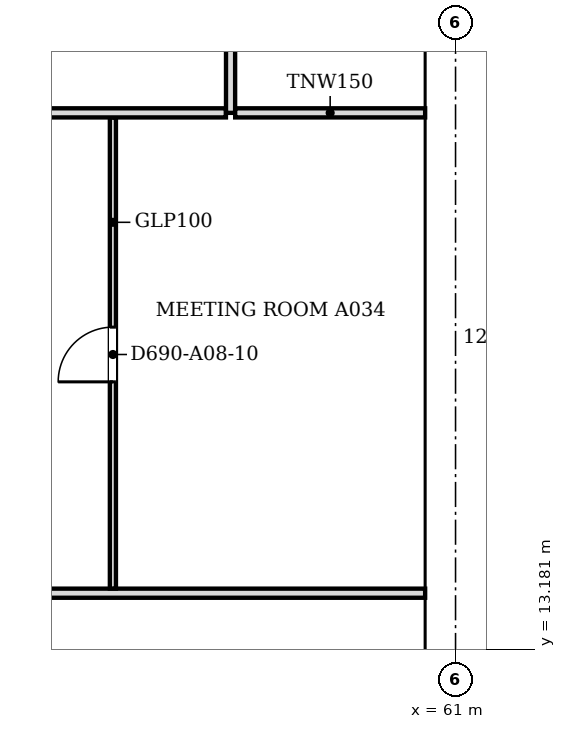
"""IFC4 building model, lengths in metres.
Left out: names, types, materials, properties, quantities, classifications, styles, units other than length and angle.
Written with IfcOpenShell. Run it as: python <this file> out.ifc"""

import sys

from ifc_helpers import new_model, si_unit, direction, frame, frame_2d, origin, place, context, subcontext, project, spatial, polyline, rectangle, outline, extrude, faceted_brep, source, transform, mapped, element, fill, save


model = new_model("IFC4")
c1 = context("Model", 3, precision=1e-05, world=origin(), true_north=direction((0.0, 1.0)))
c2 = subcontext(c1, "Body", "Model", "MODEL_VIEW")
j1 = project(units=[si_unit("LENGTHUNIT", "METRE"), si_unit("PLANEANGLEUNIT", "RADIAN")], contexts=[c1])
p1 = place(None, origin())
s1 = spatial("IfcSite", under=j1, at=p1, CompositionType="ELEMENT")
p2 = place(p1, origin())
s2 = spatial("IfcBuilding", under=s1, at=p2, CompositionType="ELEMENT")
p3 = place(p2, frame((0.0, 0.0, 91.4)))
s3 = spatial("IfcBuildingStorey", under=s2, at=p3, CompositionType="ELEMENT", Elevation=91.4)
m1 = source(origin(), c2, "Body", "SweptSolid", [
    extrude(outline(polyline([(3.05, 0.0), (6.1, 3.8), (3.05, 7.6), (0.0, 3.8), (3.05, 0.0)])), frame((0.0, 0.25, 0.0), z_axis=(0.0, -1.0, 0.0), x_axis=(1.0, 0.0, 0.0)), (0.0, 0.0, 1.0), 0.5),
])
p4 = place(p3, frame((60.75, 12.2, -3.8), z_axis=(0.0, 0.0, 1.0), x_axis=(0.0, 1.0, 0.0)))
e1 = element("IfcWall", 1, at=p4, inside=s3, PredefinedType="SOLIDWALL", context=c2, shape_type="MappedRepresentation", body=[
    mapped(m1, transform((0.0, 0.0, 0.0), scale=1.0)),
])
m2 = source(origin(), c2, "Body", "SweptSolid", [
    extrude(outline(polyline([(3.05, 0.399), (5.78, 3.8), (3.05, 7.2), (0.321, 3.8), (3.05, 0.399)])), frame((0.0, 0.26, 0.0), z_axis=(0.0, -1.0, 0.0), x_axis=(1.0, 0.0, 0.0)), (0.0, 0.0, 1.0), 0.52),
])
p5 = place(p4, origin())
e2 = element("IfcOpeningElement", 2, at=p5, cuts=e1, PredefinedType="OPENING", context=c2, shape_type="MappedRepresentation", body=[
    mapped(m2, transform((0.0, 0.0, 0.0), scale=1.0)),
])
m3 = source(origin(), c2, "Body", "Brep", [
    faceted_brep([(3.05, -0.25, 0.0), (6.1, -0.25, 3.8), (6.1, -0.25, 3.8), (3.05, -0.25, 7.6), (0.0, -0.25, 3.8), (0.0, 0.25, 3.8), (3.05, 0.25, 7.6), (6.1, 0.25, 3.8), (6.1, 0.25, 3.8), (3.05, 0.25, 0.0)], [[[0, 1, 2, 3, 4]], [[5, 6, 7, 8, 9]], [[9, 8, 1, 0]], [[7, 6, 3, 2]], [[6, 5, 4, 3]], [[5, 9, 0, 4]], [[1, 8, 7, 2]]]),
])
p6 = place(p3, frame((60.75, 18.3, -3.8), z_axis=(0.0, 0.0, 1.0), x_axis=(0.0, 1.0, 0.0)))
e3 = element("IfcWall", 3, at=p6, inside=s3, PredefinedType="SOLIDWALL", context=c2, shape_type="MappedRepresentation", body=[
    mapped(m3, transform((0.0, 0.0, 0.0), scale=1.0)),
])
p7 = place(p6, origin())
e4 = element("IfcOpeningElement", 4, at=p7, cuts=e3, PredefinedType="OPENING", context=c2, shape_type="MappedRepresentation", body=[
    mapped(m2, transform((0.0, 0.0, 0.0), scale=1.0)),
])
p8 = place(p2, frame((0.0, 0.0, 95.2)))
s4 = spatial("IfcBuildingStorey", under=s2, at=p8, CompositionType="ELEMENT", Elevation=95.2)
m4 = source(origin(), c2, "Body", "SweptSolid", [
    extrude(outline(polyline([(3.05, 0.0), (6.1, 3.8), (3.05, 7.6), (0.0, 3.8), (3.05, 0.0)])), frame((0.0, 0.25, 0.0), z_axis=(0.0, -1.0, 0.0), x_axis=(1.0, 0.0, 0.0)), (0.0, 0.0, 1.0), 0.5),
])
p9 = place(p8, frame((60.75, 9.15, -3.8), z_axis=(0.0, 0.0, 1.0), x_axis=(0.0, 1.0, 0.0)))
e5 = element("IfcWall", 5, at=p9, inside=s4, PredefinedType="SOLIDWALL", context=c2, shape_type="MappedRepresentation", body=[
    mapped(m4, transform((0.0, 0.0, 0.0), scale=1.0)),
])
m5 = source(origin(), c2, "Body", "SweptSolid", [
    extrude(outline(polyline([(3.05, 0.399), (5.78, 3.8), (3.05, 7.201), (0.321, 3.8), (3.05, 0.399)])), frame((0.0, 0.26, 0.0), z_axis=(0.0, -1.0, 0.0), x_axis=(1.0, 0.0, 0.0)), (0.0, 0.0, 1.0), 0.52),
])
p10 = place(p9, origin())
e6 = element("IfcOpeningElement", 6, at=p10, cuts=e5, PredefinedType="OPENING", context=c2, shape_type="MappedRepresentation", body=[
    mapped(m5, transform((0.0, 0.0, 0.0), scale=1.0)),
])
p11 = place(p8, frame((60.75, 15.25, -3.8), z_axis=(0.0, 0.0, 1.0), x_axis=(0.0, 1.0, 0.0)))
e7 = element("IfcWall", 7, at=p11, inside=s4, PredefinedType="SOLIDWALL", context=c2, shape_type="MappedRepresentation", body=[
    mapped(m4, transform((0.0, 0.0, 0.0), scale=1.0)),
])
p12 = place(p11, origin())
e8 = element("IfcOpeningElement", 8, at=p12, cuts=e7, PredefinedType="OPENING", context=c2, shape_type="MappedRepresentation", body=[
    mapped(m5, transform((0.0, 0.0, 0.0), scale=1.0)),
])
m6 = source(origin(), c2, "Body", "Brep", [
    faceted_brep([(3.05, -0.25, 0.0), (6.1, -0.25, 3.8), (6.1, -0.25, 3.8), (3.05, -0.25, 7.6), (0.0, -0.25, 3.8), (0.0, 0.25, 3.8), (3.05, 0.25, 7.6), (6.1, 0.25, 3.8), (6.1, 0.25, 3.8), (3.05, 0.25, 0.0)], [[[0, 1, 2, 3, 4]], [[5, 6, 7, 8, 9]], [[9, 8, 1, 0]], [[7, 6, 3, 2]], [[6, 5, 4, 3]], [[5, 9, 0, 4]], [[1, 8, 7, 2]]]),
])
p13 = place(p8, frame((60.75, 21.35, -3.8), z_axis=(0.0, 0.0, 1.0), x_axis=(0.0, 1.0, 0.0)))
e9 = element("IfcWall", 9, at=p13, inside=s4, PredefinedType="SOLIDWALL", context=c2, shape_type="MappedRepresentation", body=[
    mapped(m6, transform((0.0, 0.0, 0.0), scale=1.0)),
])
p14 = place(p13, origin())
e10 = element("IfcOpeningElement", 10, at=p14, cuts=e9, PredefinedType="OPENING", context=c2, shape_type="MappedRepresentation", body=[
    mapped(m5, transform((0.0, 0.0, 0.0), scale=1.0)),
])
p15 = place(p3, frame((45.476, 14.1, 0.0), z_axis=(0.0, 0.0, 1.0), x_axis=(1.0, 0.0, 0.0)))
e11 = element("IfcWall", 11, at=p15, inside=s3, PredefinedType="PARTITIONING", context=c2, shape_type="SweptSolid", body=[
    extrude(rectangle(XDim=15.024, YDim=0.15, at=frame_2d((7.512, 0.0))), origin(), (0.0, 0.0, 1.0), 2.895),
])
p16 = place(p3, frame((55.365, 21.924, 0.0), z_axis=(0.0, 0.0, 1.0), x_axis=(0.0, -1.0, 0.0)))
e12 = element("IfcWall", 12, at=p16, inside=s3, PredefinedType="PARTITIONING", context=c2, shape_type="SweptSolid", body=[
    extrude(rectangle(XDim=7.748, YDim=0.1, at=frame_2d((3.874, 0.0))), origin(), (0.0, 0.0, 1.0), 2.895),
])
m7 = source(origin(), c2, "Body", "SweptSolid", [
    extrude(rectangle(XDim=0.9, YDim=2.1, at=frame_2d((0.45, 1.05))), frame((0.0, 0.06, 0.0), z_axis=(0.0, -1.0, 0.0), x_axis=(1.0, 0.0, 0.0)), (0.0, 0.0, 1.0), 0.12),
])
p17 = place(p16, frame((3.448, 0.0, 0.0)))
e13 = element("IfcOpeningElement", 13, at=p17, cuts=e12, PredefinedType="OPENING", context=c2, shape_type="MappedRepresentation", body=[
    mapped(m7, transform((0.0, 0.0, 0.0), scale=1.0)),
])
p18 = place(p3, frame((45.4, 22.0, 0.0), z_axis=(0.0, 0.0, 1.0), x_axis=(1.0, 0.0, 0.0)))
e14 = element("IfcWall", 14, at=p18, inside=s3, PredefinedType="PARTITIONING", context=c2, shape_type="SweptSolid", body=[
    extrude(rectangle(XDim=11.824, YDim=0.15, at=frame_2d((5.912, 0.0))), origin(), (0.0, 0.0, 1.0), 2.895),
])
p19 = place(p3, frame((57.3, 30.6, 0.0), z_axis=(0.0, 0.0, 1.0), x_axis=(0.0, -1.0, 0.0)))
e15 = element("IfcWall", 15, at=p19, inside=s3, PredefinedType="PARTITIONING", context=c2, shape_type="SweptSolid", body=[
    extrude(rectangle(XDim=8.6, YDim=0.15, at=frame_2d((4.3, 0.0))), origin(), (0.0, 0.0, 1.0), 2.895),
])
m8 = source(origin(), c2, "Body", "SweptSolid", [
    extrude(rectangle(XDim=0.9, YDim=2.1, at=frame_2d((0.45, 1.05))), frame((0.0, 0.085, 0.0), z_axis=(0.0, -1.0, 0.0), x_axis=(1.0, 0.0, 0.0)), (0.0, 0.0, 1.0), 0.17),
])
p20 = place(p19, frame((3.9, 0.0, 0.0)))
e16 = element("IfcOpeningElement", 16, at=p20, cuts=e15, PredefinedType="OPENING", context=c2, shape_type="MappedRepresentation", body=[
    mapped(m8, transform((0.0, 0.0, 0.0), scale=1.0)),
])
p21 = place(p3, frame((57.376, 22.0, 0.0), z_axis=(0.0, 0.0, 1.0), x_axis=(1.0, 0.0, 0.0)))
e17 = element("IfcWall", 17, at=p21, inside=s3, PredefinedType="PARTITIONING", context=c2, shape_type="SweptSolid", body=[
    extrude(rectangle(XDim=3.124, YDim=0.15, at=frame_2d((1.562, 0.0))), origin(), (0.0, 0.0, 1.0), 2.895),
])
m9 = source(origin(), c2, "Body", "SweptSolid", [
    extrude(rectangle(XDim=0.9, YDim=2.1, at=frame_2d((0.45, 1.05))), frame((0.0, 0.025, 0.0), z_axis=(0.0, -1.0, 0.0), x_axis=(1.0, 0.0, 0.0)), (0.0, 0.0, 1.0), 0.05),
])
p22 = place(p17, origin())
e18 = element("IfcDoor", 18, at=p22, inside=s3, OperationType="SINGLE_SWING_RIGHT", PredefinedType="DOOR", context=c2, shape_type="MappedRepresentation", body=[
    mapped(m9, transform((0.0, 0.0, 0.0), scale=1.0)),
])
fill(e13, e18)
save(model, sys.argv[1])
